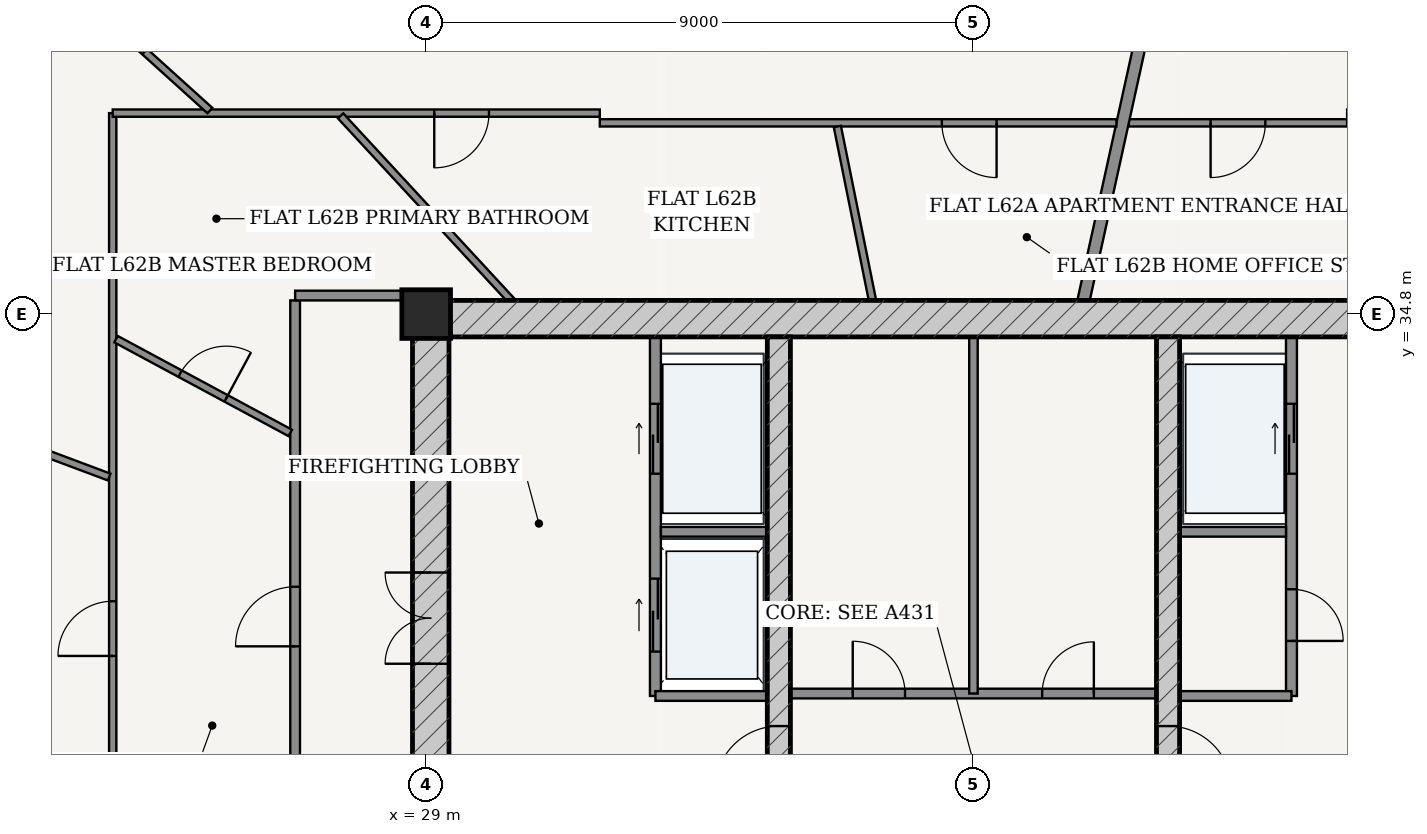
"""IFC4 building model, lengths in metres.
Left out: names, types, materials, properties, quantities, classifications, styles, units other than length and angle.
Written with IfcOpenShell. Run it as: python <this file> out.ifc"""

import sys

from ifc_helpers import new_model, si_unit, direction, frame, frame_2d, origin, origin_2d, place, context, subcontext, project, spatial, rectangle, extrude, source, transform, mapped, element, fill, save


model = new_model("IFC4")
c1 = context("Model", 3, precision=1e-05, world=origin(), true_north=direction((-0.2419218956, 0.970295726276)))
c2 = subcontext(c1, "Body", "Model", "MODEL_VIEW")
j1 = project(units=[si_unit("LENGTHUNIT", "METRE"), si_unit("PLANEANGLEUNIT", "RADIAN")], contexts=[c1])
p1 = place(None, origin())
s1 = spatial("IfcSite", under=j1, at=p1, CompositionType="ELEMENT")
p2 = place(p1, origin())
s2 = spatial("IfcBuilding", under=s1, at=p2, CompositionType="ELEMENT")
p3 = place(p2, frame((0.0, 0.0, 235.6)))
s3 = spatial("IfcBuildingStorey", under=s2, at=p3, CompositionType="ELEMENT", Elevation=235.6)
p4 = place(p3, frame((29.0, 34.8, 0.0), z_axis=(0.0, 0.0, 1.0), x_axis=(1.0, 0.0, 0.0)))
e1 = element("IfcColumn", 1, at=p4, inside=s3, PredefinedType="COLUMN", context=c2, shape_type="SweptSolid", body=[
    extrude(rectangle(XDim=0.8, YDim=0.8, at=origin_2d()), origin(), (0.0, 0.0, 1.0), 3.7),
])
p5 = place(p3, frame((28.775, 34.725, 0.0), z_axis=(0.0, 0.0, 1.0), x_axis=(1.0, 0.0, 0.0)))
e2 = element("IfcWall", 2, at=p5, inside=s3, PredefinedType="SHEAR", context=c2, shape_type="SweptSolid", body=[
    extrude(rectangle(XDim=18.45, YDim=0.6, at=frame_2d((9.225, 0.0))), origin(), (0.0, 0.0, 1.0), 3.435),
])
p6 = place(p3, frame((29.075, 19.175, 0.0), z_axis=(0.0, 0.0, 1.0), x_axis=(0.0, 1.0, 0.0)))
e3 = element("IfcWall", 3, at=p6, inside=s3, PredefinedType="SHEAR", context=c2, shape_type="SweptSolid", body=[
    extrude(rectangle(XDim=15.25, YDim=0.6, at=frame_2d((7.625, 0.0))), origin(), (0.0, 0.0, 1.0), 3.435),
])
p7 = place(p6, frame((9.875, 0.0, 0.0)))
e4 = element("IfcOpeningElement", 4, at=p7, cuts=e3, PredefinedType="OPENING", context=c2, shape_type="SweptSolid", body=[
    extrude(rectangle(XDim=1.5, YDim=2.2, at=frame_2d((0.75, 1.1))), frame((0.0, 0.31, 0.0), z_axis=(0.0, -1.0, 0.0), x_axis=(1.0, 0.0, 0.0)), (0.0, 0.0, 1.0), 0.62),
])
p8 = place(p3, frame((34.8, 19.175, 0.0), z_axis=(0.0, 0.0, 1.0), x_axis=(0.0, 1.0, 0.0)))
e5 = element("IfcWall", 5, at=p8, inside=s3, PredefinedType="SHEAR", context=c2, shape_type="SweptSolid", body=[
    extrude(rectangle(XDim=15.25, YDim=0.38, at=frame_2d((7.625, 0.0))), origin(), (0.0, 0.0, 1.0), 3.435),
])
p9 = place(p8, frame((7.8, 0.0, 0.0)))
e6 = element("IfcOpeningElement", 6, at=p9, cuts=e5, PredefinedType="OPENING", context=c2, shape_type="SweptSolid", body=[
    extrude(rectangle(XDim=1.05, YDim=2.15, at=frame_2d((0.525, 1.075))), frame((0.0, 0.2, 0.0), z_axis=(0.0, -1.0, 0.0), x_axis=(1.0, 0.0, 0.0)), (0.0, 0.0, 1.0), 0.4),
])
p10 = place(p3, frame((41.2, 19.175, 0.0), z_axis=(0.0, 0.0, 1.0), x_axis=(0.0, 1.0, 0.0)))
e7 = element("IfcWall", 7, at=p10, inside=s3, PredefinedType="SHEAR", context=c2, shape_type="SweptSolid", body=[
    extrude(rectangle(XDim=15.25, YDim=0.38, at=frame_2d((7.625, 0.0))), origin(), (0.0, 0.0, 1.0), 3.435),
])
p11 = place(p10, frame((7.8, 0.0, 0.0)))
e8 = element("IfcOpeningElement", 8, at=p11, cuts=e7, PredefinedType="OPENING", context=c2, shape_type="SweptSolid", body=[
    extrude(rectangle(XDim=1.05, YDim=2.15, at=frame_2d((0.525, 1.075))), frame((0.0, 0.2, 0.0), z_axis=(0.0, -1.0, 0.0), x_axis=(1.0, 0.0, 0.0)), (0.0, 0.0, 1.0), 0.4),
])
p12 = place(p3, frame((32.77, 28.52, 0.0), z_axis=(0.0, 0.0, 1.0), x_axis=(0.0, 1.0, 0.0)))
e9 = element("IfcWall", 9, at=p12, inside=s3, PredefinedType="PARTITIONING", context=c2, shape_type="SweptSolid", body=[
    extrude(rectangle(XDim=5.905, YDim=0.18, at=frame_2d((2.953, 0.0))), origin(), (0.0, 0.0, 1.0), 3.435),
])
p13 = place(p12, frame((3.655, 0.0, 0.0)))
e10 = element("IfcOpeningElement", 10, at=p13, cuts=e9, PredefinedType="OPENING", context=c2, shape_type="SweptSolid", body=[
    extrude(rectangle(XDim=1.15, YDim=2.2, at=frame_2d((0.575, 1.1))), frame((0.0, 0.1, 0.0), z_axis=(0.0, -1.0, 0.0), x_axis=(1.0, 0.0, 0.0)), (0.0, 0.0, 1.0), 0.2),
])
p14 = place(p12, frame((0.73, 0.0, 0.0)))
e11 = element("IfcOpeningElement", 11, at=p14, cuts=e9, PredefinedType="OPENING", context=c2, shape_type="SweptSolid", body=[
    extrude(rectangle(XDim=1.2, YDim=2.25, at=frame_2d((0.6, 1.125))), frame((0.0, 0.1, 0.0), z_axis=(0.0, -1.0, 0.0), x_axis=(1.0, 0.0, 0.0)), (0.0, 0.0, 1.0), 0.2),
])
p15 = place(p3, frame((32.86, 31.22, 0.0), z_axis=(0.0, 0.0, 1.0), x_axis=(1.0, 0.0, 0.0)))
e12 = element("IfcWall", 12, at=p15, inside=s3, PredefinedType="PARTITIONING", context=c2, shape_type="SweptSolid", body=[
    extrude(rectangle(XDim=1.75, YDim=0.16, at=frame_2d((0.875, 0.0))), origin(), (0.0, 0.0, 1.0), 3.435),
])
p16 = place(p3, frame((32.77, 28.52, 0.0), z_axis=(0.0, 0.0, 1.0), x_axis=(1.0, 0.0, 0.0)))
e13 = element("IfcWall", 13, at=p16, inside=s3, PredefinedType="PARTITIONING", context=c2, shape_type="SweptSolid", body=[
    extrude(rectangle(XDim=1.84, YDim=0.16, at=frame_2d((0.92, 0.0))), origin(), (0.0, 0.0, 1.0), 3.435),
])
p17 = place(p3, frame((43.23, 28.52, 0.0), z_axis=(0.0, 0.0, 1.0), x_axis=(0.0, 1.0, 0.0)))
e14 = element("IfcWall", 14, at=p17, inside=s3, PredefinedType="PARTITIONING", context=c2, shape_type="SweptSolid", body=[
    extrude(rectangle(XDim=5.905, YDim=0.18, at=frame_2d((2.953, 0.0))), origin(), (0.0, 0.0, 1.0), 3.435),
])
p18 = place(p17, frame((0.905, 0.0, 0.0)))
e15 = element("IfcOpeningElement", 15, at=p18, cuts=e14, PredefinedType="OPENING", context=c2, shape_type="SweptSolid", body=[
    extrude(rectangle(XDim=0.85, YDim=2.1, at=frame_2d((0.425, 1.05))), frame((0.0, 0.1, 0.0), z_axis=(0.0, -1.0, 0.0), x_axis=(1.0, 0.0, 0.0)), (0.0, 0.0, 1.0), 0.2),
])
p19 = place(p17, frame((3.655, 0.0, 0.0)))
e16 = element("IfcOpeningElement", 16, at=p19, cuts=e14, PredefinedType="OPENING", context=c2, shape_type="SweptSolid", body=[
    extrude(rectangle(XDim=1.15, YDim=2.2, at=frame_2d((0.575, 1.1))), frame((0.0, 0.1, 0.0), z_axis=(0.0, -1.0, 0.0), x_axis=(1.0, 0.0, 0.0)), (0.0, 0.0, 1.0), 0.2),
])
p20 = place(p3, frame((41.39, 31.22, 0.0), z_axis=(0.0, 0.0, 1.0), x_axis=(1.0, 0.0, 0.0)))
e17 = element("IfcWall", 17, at=p20, inside=s3, PredefinedType="PARTITIONING", context=c2, shape_type="SweptSolid", body=[
    extrude(rectangle(XDim=1.75, YDim=0.16, at=frame_2d((0.875, 0.0))), origin(), (0.0, 0.0, 1.0), 3.435),
])
p21 = place(p3, frame((41.39, 28.52, 0.0), z_axis=(0.0, 0.0, 1.0), x_axis=(1.0, 0.0, 0.0)))
e18 = element("IfcWall", 18, at=p21, inside=s3, PredefinedType="PARTITIONING", context=c2, shape_type="SweptSolid", body=[
    extrude(rectangle(XDim=1.84, YDim=0.16, at=frame_2d((0.92, 0.0))), origin(), (0.0, 0.0, 1.0), 3.435),
])
p22 = place(p3, frame((34.99, 28.56, 0.0), z_axis=(0.0, 0.0, 1.0), x_axis=(1.0, 0.0, 0.0)))
e19 = element("IfcWall", 19, at=p22, inside=s3, PredefinedType="PARTITIONING", context=c2, shape_type="SweptSolid", body=[
    extrude(rectangle(XDim=6.02, YDim=0.16, at=frame_2d((3.01, 0.0))), origin(), (0.0, 0.0, 1.0), 3.435),
])
p23 = place(p22, frame((1.025, 0.0, 0.0)))
e20 = element("IfcOpeningElement", 20, at=p23, cuts=e19, PredefinedType="OPENING", context=c2, shape_type="SweptSolid", body=[
    extrude(rectangle(XDim=0.86, YDim=2.1, at=frame_2d((0.43, 1.05))), frame((0.0, 0.09, 0.0), z_axis=(0.0, -1.0, 0.0), x_axis=(1.0, 0.0, 0.0)), (0.0, 0.0, 1.0), 0.18),
])
p24 = place(p22, frame((4.14, 0.0, 0.0)))
e21 = element("IfcOpeningElement", 21, at=p24, cuts=e19, PredefinedType="OPENING", context=c2, shape_type="SweptSolid", body=[
    extrude(rectangle(XDim=0.85, YDim=2.1, at=frame_2d((0.425, 1.05))), frame((0.0, 0.09, 0.0), z_axis=(0.0, -1.0, 0.0), x_axis=(1.0, 0.0, 0.0)), (0.0, 0.0, 1.0), 0.18),
])
p25 = place(p3, frame((38.0, 28.56, 0.0), z_axis=(0.0, 0.0, 1.0), x_axis=(0.0, 1.0, 0.0)))
e22 = element("IfcWall", 22, at=p25, inside=s3, PredefinedType="PARTITIONING", context=c2, shape_type="SweptSolid", body=[
    extrude(rectangle(XDim=5.865, YDim=0.14, at=frame_2d((2.933, 0.0))), origin(), (0.0, 0.0, 1.0), 3.435),
])
p26 = place(p3, frame((26.845, 24.4, 0.0), z_axis=(0.0, 0.0, 1.0), x_axis=(0.0, 1.0, 0.0)))
e23 = element("IfcWall", 23, at=p26, inside=s3, PredefinedType="PARTITIONING", context=c2, shape_type="SweptSolid", body=[
    extrude(rectangle(XDim=10.625, YDim=0.16, at=frame_2d((5.312, 0.0))), origin(), (0.0, 0.0, 1.0), 2.951),
])
p27 = place(p26, frame((4.936, 0.0, 0.0)))
e24 = element("IfcOpeningElement", 24, at=p27, cuts=e23, PredefinedType="OPENING", context=c2, shape_type="SweptSolid", body=[
    extrude(rectangle(XDim=0.98, YDim=2.2, at=frame_2d((0.49, 1.1))), frame((0.0, 0.09, 0.0), z_axis=(0.0, -1.0, 0.0), x_axis=(1.0, 0.0, 0.0)), (0.0, 0.0, 1.0), 0.18),
])
p28 = place(p3, frame((26.845, 35.105, 0.0), z_axis=(0.0, 0.0, 1.0), x_axis=(1.0, 0.0, 0.0)))
e25 = element("IfcWall", 25, at=p28, inside=s3, PredefinedType="PARTITIONING", context=c2, shape_type="SweptSolid", body=[
    extrude(rectangle(XDim=1.93, YDim=0.16, at=frame_2d((0.965, 0.0))), origin(), (0.0, 0.0, 1.0), 3.435),
])
p29 = place(p3, frame((40.555, 37.945, 0.0), z_axis=(0.0, 0.0, 1.0), x_axis=(1.0, 0.0, 0.0)))
e26 = element("IfcWall", 26, at=p29, inside=s3, PredefinedType="PARTITIONING", context=c2, shape_type="SweptSolid", body=[
    extrude(rectangle(XDim=3.59, YDim=0.12, at=frame_2d((1.795, 0.0))), origin(), (0.0, 0.0, 1.0), 2.951),
])
p30 = place(p29, frame((1.345, 0.0, 0.0)))
e27 = element("IfcOpeningElement", 27, at=p30, cuts=e26, PredefinedType="OPENING", context=c2, shape_type="SweptSolid", body=[
    extrude(rectangle(XDim=0.9, YDim=2.15, at=frame_2d((0.45, 1.075))), frame((0.0, 0.07, 0.0), z_axis=(0.0, -1.0, 0.0), x_axis=(1.0, 0.0, 0.0)), (0.0, 0.0, 1.0), 0.14),
])
p31 = place(p3, frame((39.811, 35.027, 0.0), z_axis=(0.0, 0.0, 1.0), x_axis=(0.214966857327, 0.976621344356, 0.0)))
e28 = element("IfcWall", 28, at=p31, inside=s3, PredefinedType="PARTITIONING", context=c2, shape_type="SweptSolid", body=[
    extrude(rectangle(XDim=11.258, YDim=0.2, at=frame_2d((5.629, 0.0))), origin(), (0.0, 0.0, 1.0), 2.52),
])
p32 = place(p3, frame((23.845, 26.902, 0.0), z_axis=(0.0, 0.0, 1.0), x_axis=(0.0, 1.0, 0.0)))
e29 = element("IfcWall", 29, at=p32, inside=s3, PredefinedType="PARTITIONING", context=c2, shape_type="SweptSolid", body=[
    extrude(rectangle(XDim=11.203, YDim=0.12, at=frame_2d((5.602, 0.0))), origin(), (0.0, 0.0, 1.0), 2.951),
])
p33 = place(p32, frame((2.276, 0.0, 0.0)))
e30 = element("IfcOpeningElement", 30, at=p33, cuts=e29, PredefinedType="OPENING", context=c2, shape_type="SweptSolid", body=[
    extrude(rectangle(XDim=0.9, YDim=2.15, at=frame_2d((0.45, 1.075))), frame((0.0, 0.07, 0.0), z_axis=(0.0, -1.0, 0.0), x_axis=(1.0, 0.0, 0.0)), (0.0, 0.0, 1.0), 0.14),
])
p34 = place(p3, frame((23.845, 38.105, 0.0), z_axis=(0.0, 0.0, 1.0), x_axis=(1.0, 0.0, 0.0)))
e31 = element("IfcWall", 31, at=p34, inside=s3, PredefinedType="PARTITIONING", context=c2, shape_type="SweptSolid", body=[
    extrude(rectangle(XDim=8.01, YDim=0.12, at=frame_2d((4.005, 0.0))), origin(), (0.0, 0.0, 1.0), 2.951),
])
p35 = place(p34, frame((5.288, 0.0, 0.0)))
e32 = element("IfcOpeningElement", 32, at=p35, cuts=e31, PredefinedType="OPENING", context=c2, shape_type="SweptSolid", body=[
    extrude(rectangle(XDim=0.9, YDim=2.15, at=frame_2d((0.45, 1.075))), frame((0.0, 0.07, 0.0), z_axis=(0.0, -1.0, 0.0), x_axis=(1.0, 0.0, 0.0)), (0.0, 0.0, 1.0), 0.14),
])
p36 = place(p3, frame((31.855, 37.945, 0.0), z_axis=(0.0, 0.0, 1.0), x_axis=(1.0, 0.0, 0.0)))
e33 = element("IfcWall", 33, at=p36, inside=s3, PredefinedType="PARTITIONING", context=c2, shape_type="SweptSolid", body=[
    extrude(rectangle(XDim=8.496, YDim=0.12, at=frame_2d((4.248, 0.0))), origin(), (0.0, 0.0, 1.0), 2.951),
])
p37 = place(p36, frame((5.625, 0.0, 0.0)))
e34 = element("IfcOpeningElement", 34, at=p37, cuts=e33, PredefinedType="OPENING", context=c2, shape_type="SweptSolid", body=[
    extrude(rectangle(XDim=0.9, YDim=2.15, at=frame_2d((0.45, 1.075))), frame((0.0, 0.07, 0.0), z_axis=(0.0, -1.0, 0.0), x_axis=(1.0, 0.0, 0.0)), (0.0, 0.0, 1.0), 0.14),
])
p38 = place(p3, frame((25.444, 38.146, 0.0), z_axis=(0.0, 0.0, 1.0), x_axis=(-0.741941434687, 0.670464695189, 0.0)))
e35 = element("IfcWall", 35, at=p38, inside=s3, PredefinedType="PARTITIONING", context=c2, shape_type="SweptSolid", body=[
    extrude(rectangle(XDim=3.792, YDim=0.12, at=frame_2d((1.896, 0.0))), origin(), (0.0, 0.0, 1.0), 2.951),
])
p39 = place(p38, frame((1.446, 0.0, 0.0)))
e36 = element("IfcOpeningElement", 36, at=p39, cuts=e35, PredefinedType="OPENING", context=c2, shape_type="SweptSolid", body=[
    extrude(rectangle(XDim=0.9, YDim=2.15, at=frame_2d((0.45, 1.075))), frame((0.0, 0.07, 0.0), z_axis=(0.0, -1.0, 0.0), x_axis=(1.0, 0.0, 0.0)), (0.0, 0.0, 1.0), 0.14),
])
p40 = place(p3, frame((23.787, 32.12, 0.0), z_axis=(0.0, 0.0, 1.0), x_axis=(-0.936540304423, 0.35055992097, 0.0)))
e37 = element("IfcWall", 37, at=p40, inside=s3, PredefinedType="PARTITIONING", context=c2, shape_type="SweptSolid", body=[
    extrude(rectangle(XDim=6.268, YDim=0.12, at=frame_2d((3.134, 0.0))), origin(), (0.0, 0.0, 1.0), 2.951),
])
p41 = place(p40, frame((2.684, 0.0, 0.0)))
e38 = element("IfcOpeningElement", 38, at=p41, cuts=e37, PredefinedType="OPENING", context=c2, shape_type="SweptSolid", body=[
    extrude(rectangle(XDim=0.9, YDim=2.15, at=frame_2d((0.45, 1.075))), frame((0.0, 0.07, 0.0), z_axis=(0.0, -1.0, 0.0), x_axis=(1.0, 0.0, 0.0)), (0.0, 0.0, 1.0), 0.14),
])
p42 = place(p3, frame((36.339, 35.027, 0.0), z_axis=(0.0, 0.0, 1.0), x_axis=(-0.197903570547, 0.980221493727, 0.0)))
e39 = element("IfcWall", 39, at=p42, inside=s3, PredefinedType="PARTITIONING", context=c2, shape_type="SweptSolid", body=[
    extrude(rectangle(XDim=2.915, YDim=0.12, at=frame_2d((1.458, 0.0))), origin(), (0.0, 0.0, 1.0), 2.52),
])
p43 = place(p3, frame((30.396, 35.026, 0.0), z_axis=(0.0, 0.0, 1.0), x_axis=(-0.678748871003, 0.73437045836, 0.0)))
e40 = element("IfcWall", 40, at=p43, inside=s3, PredefinedType="PARTITIONING", context=c2, shape_type="SweptSolid", body=[
    extrude(rectangle(XDim=4.13, YDim=0.12, at=frame_2d((2.065, 0.0))), origin(), (0.0, 0.0, 1.0), 2.951),
])
p44 = place(p3, frame((26.765, 32.845, 0.0), z_axis=(0.0, 0.0, 1.0), x_axis=(-0.88057708661, 0.473902937886, 0.0)))
e41 = element("IfcWall", 41, at=p44, inside=s3, PredefinedType="PARTITIONING", context=c2, shape_type="SweptSolid", body=[
    extrude(rectangle(XDim=3.254, YDim=0.12, at=frame_2d((1.627, 0.0))), origin(), (0.0, 0.0, 1.0), 3.11),
])
p45 = place(p44, frame((1.197, 0.0, 0.0)))
e42 = element("IfcOpeningElement", 42, at=p45, cuts=e41, PredefinedType="OPENING", context=c2, shape_type="SweptSolid", body=[
    extrude(rectangle(XDim=0.86, YDim=2.15, at=frame_2d((0.43, 1.075))), frame((0.0, 0.07, 0.0), z_axis=(0.0, -1.0, 0.0), x_axis=(1.0, 0.0, 0.0)), (0.0, 0.0, 1.0), 0.14),
])
m1 = source(origin(), c2, "Body", "SweptSolid", [
    extrude(rectangle(XDim=1.5, YDim=2.2, at=frame_2d((0.75, 1.1))), frame((0.0, 0.025, 0.0), z_axis=(0.0, -1.0, 0.0), x_axis=(1.0, 0.0, 0.0)), (0.0, 0.0, 1.0), 0.05),
])
p46 = place(p7, origin())
e43 = element("IfcDoor", 43, at=p46, inside=s3, OperationType="DOUBLE_DOOR_SINGLE_SWING", PredefinedType="DOOR", context=c2, shape_type="MappedRepresentation", body=[
    mapped(m1, transform((0.0, 0.0, 0.0), scale=1.0)),
])
fill(e4, e43)
m2 = source(origin(), c2, "Body", "SweptSolid", [
    extrude(rectangle(XDim=1.05, YDim=2.15, at=frame_2d((0.525, 1.075))), frame((0.0, 0.025, 0.0), z_axis=(0.0, -1.0, 0.0), x_axis=(1.0, 0.0, 0.0)), (0.0, 0.0, 1.0), 0.05),
])
p47 = place(p9, origin())
e44 = element("IfcDoor", 44, at=p47, inside=s3, OperationType="SINGLE_SWING_LEFT", PredefinedType="DOOR", context=c2, shape_type="MappedRepresentation", body=[
    mapped(m2, transform((0.0, 0.0, 0.0), scale=1.0)),
])
fill(e6, e44)
p48 = place(p11, frame((1.05, 0.0, 0.0), z_axis=(0.0, 0.0, 1.0), x_axis=(-1.0, 0.0, 0.0)))
e45 = element("IfcDoor", 45, at=p48, inside=s3, OperationType="SINGLE_SWING_RIGHT", PredefinedType="DOOR", context=c2, shape_type="MappedRepresentation", body=[
    mapped(m2, transform((0.0, 0.0, 0.0), scale=1.0)),
])
fill(e8, e45)
m3 = source(origin(), c2, "Body", "SweptSolid", [
    extrude(rectangle(XDim=0.85, YDim=2.1, at=frame_2d((0.425, 1.05))), frame((0.0, 0.025, 0.0), z_axis=(0.0, -1.0, 0.0), x_axis=(1.0, 0.0, 0.0)), (0.0, 0.0, 1.0), 0.05),
])
p49 = place(p18, frame((0.85, 0.0, 0.0), z_axis=(0.0, 0.0, 1.0), x_axis=(-1.0, 0.0, 0.0)))
e46 = element("IfcDoor", 46, at=p49, inside=s3, OperationType="SINGLE_SWING_RIGHT", PredefinedType="DOOR", context=c2, shape_type="MappedRepresentation", body=[
    mapped(m3, transform((0.0, 0.0, 0.0), scale=1.0)),
])
fill(e15, e46)
m4 = source(origin(), c2, "Body", "SweptSolid", [
    extrude(rectangle(XDim=0.86, YDim=2.1, at=frame_2d((0.43, 1.05))), frame((0.0, 0.025, 0.0), z_axis=(0.0, -1.0, 0.0), x_axis=(1.0, 0.0, 0.0)), (0.0, 0.0, 1.0), 0.05),
])
p50 = place(p23, origin())
e47 = element("IfcDoor", 47, at=p50, inside=s3, OperationType="SINGLE_SWING_LEFT", PredefinedType="DOOR", context=c2, shape_type="MappedRepresentation", body=[
    mapped(m4, transform((0.0, 0.0, 0.0), scale=1.0)),
])
fill(e20, e47)
p51 = place(p24, origin())
e48 = element("IfcDoor", 48, at=p51, inside=s3, OperationType="SINGLE_SWING_RIGHT", PredefinedType="DOOR", context=c2, shape_type="MappedRepresentation", body=[
    mapped(m3, transform((0.0, 0.0, 0.0), scale=1.0)),
])
fill(e21, e48)
m5 = source(origin(), c2, "Body", "SweptSolid", [
    extrude(rectangle(XDim=1.15, YDim=2.2, at=frame_2d((0.575, 1.1))), frame((0.0, 0.025, 0.0), z_axis=(0.0, -1.0, 0.0), x_axis=(1.0, 0.0, 0.0)), (0.0, 0.0, 1.0), 0.05),
])
p52 = place(p13, origin())
e49 = element("IfcDoor", 49, at=p52, inside=s3, OperationType="DOUBLE_DOOR_SLIDING", PredefinedType="DOOR", context=c2, shape_type="MappedRepresentation", body=[
    mapped(m5, transform((0.0, 0.0, 0.0), scale=1.0)),
])
fill(e10, e49)
p53 = place(p19, origin())
e50 = element("IfcDoor", 50, at=p53, inside=s3, OperationType="DOUBLE_DOOR_SLIDING", PredefinedType="DOOR", context=c2, shape_type="MappedRepresentation", body=[
    mapped(m5, transform((0.0, 0.0, 0.0), scale=1.0)),
])
fill(e16, e50)
m6 = source(origin(), c2, "Body", "SweptSolid", [
    extrude(rectangle(XDim=1.2, YDim=2.25, at=frame_2d((0.6, 1.125))), frame((0.0, 0.025, 0.0), z_axis=(0.0, -1.0, 0.0), x_axis=(1.0, 0.0, 0.0)), (0.0, 0.0, 1.0), 0.05),
])
p54 = place(p14, origin())
e51 = element("IfcDoor", 51, at=p54, inside=s3, OperationType="DOUBLE_DOOR_SLIDING", PredefinedType="DOOR", context=c2, shape_type="MappedRepresentation", body=[
    mapped(m6, transform((0.0, 0.0, 0.0), scale=1.0)),
])
fill(e11, e51)
m7 = source(origin(), c2, "Body", "SweptSolid", [
    extrude(rectangle(XDim=0.9, YDim=2.15, at=frame_2d((0.45, 1.075))), frame((0.0, 0.025, 0.0), z_axis=(0.0, -1.0, 0.0), x_axis=(1.0, 0.0, 0.0)), (0.0, 0.0, 1.0), 0.05),
])
p55 = place(p30, frame((0.9, 0.0, 0.0), z_axis=(0.0, 0.0, 1.0), x_axis=(-1.0, 0.0, 0.0)))
e52 = element("IfcDoor", 52, at=p55, inside=s3, OperationType="SINGLE_SWING_RIGHT", PredefinedType="DOOR", context=c2, shape_type="MappedRepresentation", body=[
    mapped(m7, transform((0.0, 0.0, 0.0), scale=1.0)),
])
fill(e27, e52)
m8 = source(origin(), c2, "Body", "SweptSolid", [
    extrude(rectangle(XDim=0.98, YDim=2.2, at=frame_2d((0.49, 1.1))), frame((0.0, 0.025, 0.0), z_axis=(0.0, -1.0, 0.0), x_axis=(1.0, 0.0, 0.0)), (0.0, 0.0, 1.0), 0.05),
])
p56 = place(p27, origin())
e53 = element("IfcDoor", 53, at=p56, inside=s3, OperationType="SINGLE_SWING_LEFT", PredefinedType="DOOR", context=c2, shape_type="MappedRepresentation", body=[
    mapped(m8, transform((0.0, 0.0, 0.0), scale=1.0)),
])
fill(e24, e53)
m9 = source(origin(), c2, "Body", "SweptSolid", [
    extrude(rectangle(XDim=0.86, YDim=2.15, at=frame_2d((0.43, 1.075))), frame((0.0, 0.025, 0.0), z_axis=(0.0, -1.0, 0.0), x_axis=(1.0, 0.0, 0.0)), (0.0, 0.0, 1.0), 0.05),
])
p57 = place(p45, frame((0.86, 0.0, 0.0), z_axis=(0.0, 0.0, 1.0), x_axis=(-1.0, 0.0, 0.0)))
e54 = element("IfcDoor", 54, at=p57, inside=s3, OperationType="SINGLE_SWING_RIGHT", PredefinedType="DOOR", context=c2, shape_type="MappedRepresentation", body=[
    mapped(m9, transform((0.0, 0.0, 0.0), scale=1.0)),
])
fill(e42, e54)
p58 = place(p33, origin())
e55 = element("IfcDoor", 55, at=p58, inside=s3, OperationType="SINGLE_SWING_LEFT", PredefinedType="DOOR", context=c2, shape_type="MappedRepresentation", body=[
    mapped(m7, transform((0.0, 0.0, 0.0), scale=1.0)),
])
fill(e30, e55)
p59 = place(p39, frame((0.9, 0.0, 0.0), z_axis=(0.0, 0.0, 1.0), x_axis=(-1.0, 0.0, 0.0)))
e56 = element("IfcDoor", 56, at=p59, inside=s3, OperationType="SINGLE_SWING_LEFT", PredefinedType="DOOR", context=c2, shape_type="MappedRepresentation", body=[
    mapped(m7, transform((0.0, 0.0, 0.0), scale=1.0)),
])
fill(e36, e56)
p60 = place(p35, frame((0.9, 0.0, 0.0), z_axis=(0.0, 0.0, 1.0), x_axis=(-1.0, 0.0, 0.0)))
e57 = element("IfcDoor", 57, at=p60, inside=s3, OperationType="SINGLE_SWING_RIGHT", PredefinedType="DOOR", context=c2, shape_type="MappedRepresentation", body=[
    mapped(m7, transform((0.0, 0.0, 0.0), scale=1.0)),
])
fill(e32, e57)
p61 = place(p37, frame((0.9, 0.0, 0.0), z_axis=(0.0, 0.0, 1.0), x_axis=(-1.0, 0.0, 0.0)))
e58 = element("IfcDoor", 58, at=p61, inside=s3, OperationType="SINGLE_SWING_LEFT", PredefinedType="DOOR", context=c2, shape_type="MappedRepresentation", body=[
    mapped(m7, transform((0.0, 0.0, 0.0), scale=1.0)),
])
fill(e34, e58)
save(model, sys.argv[1])
